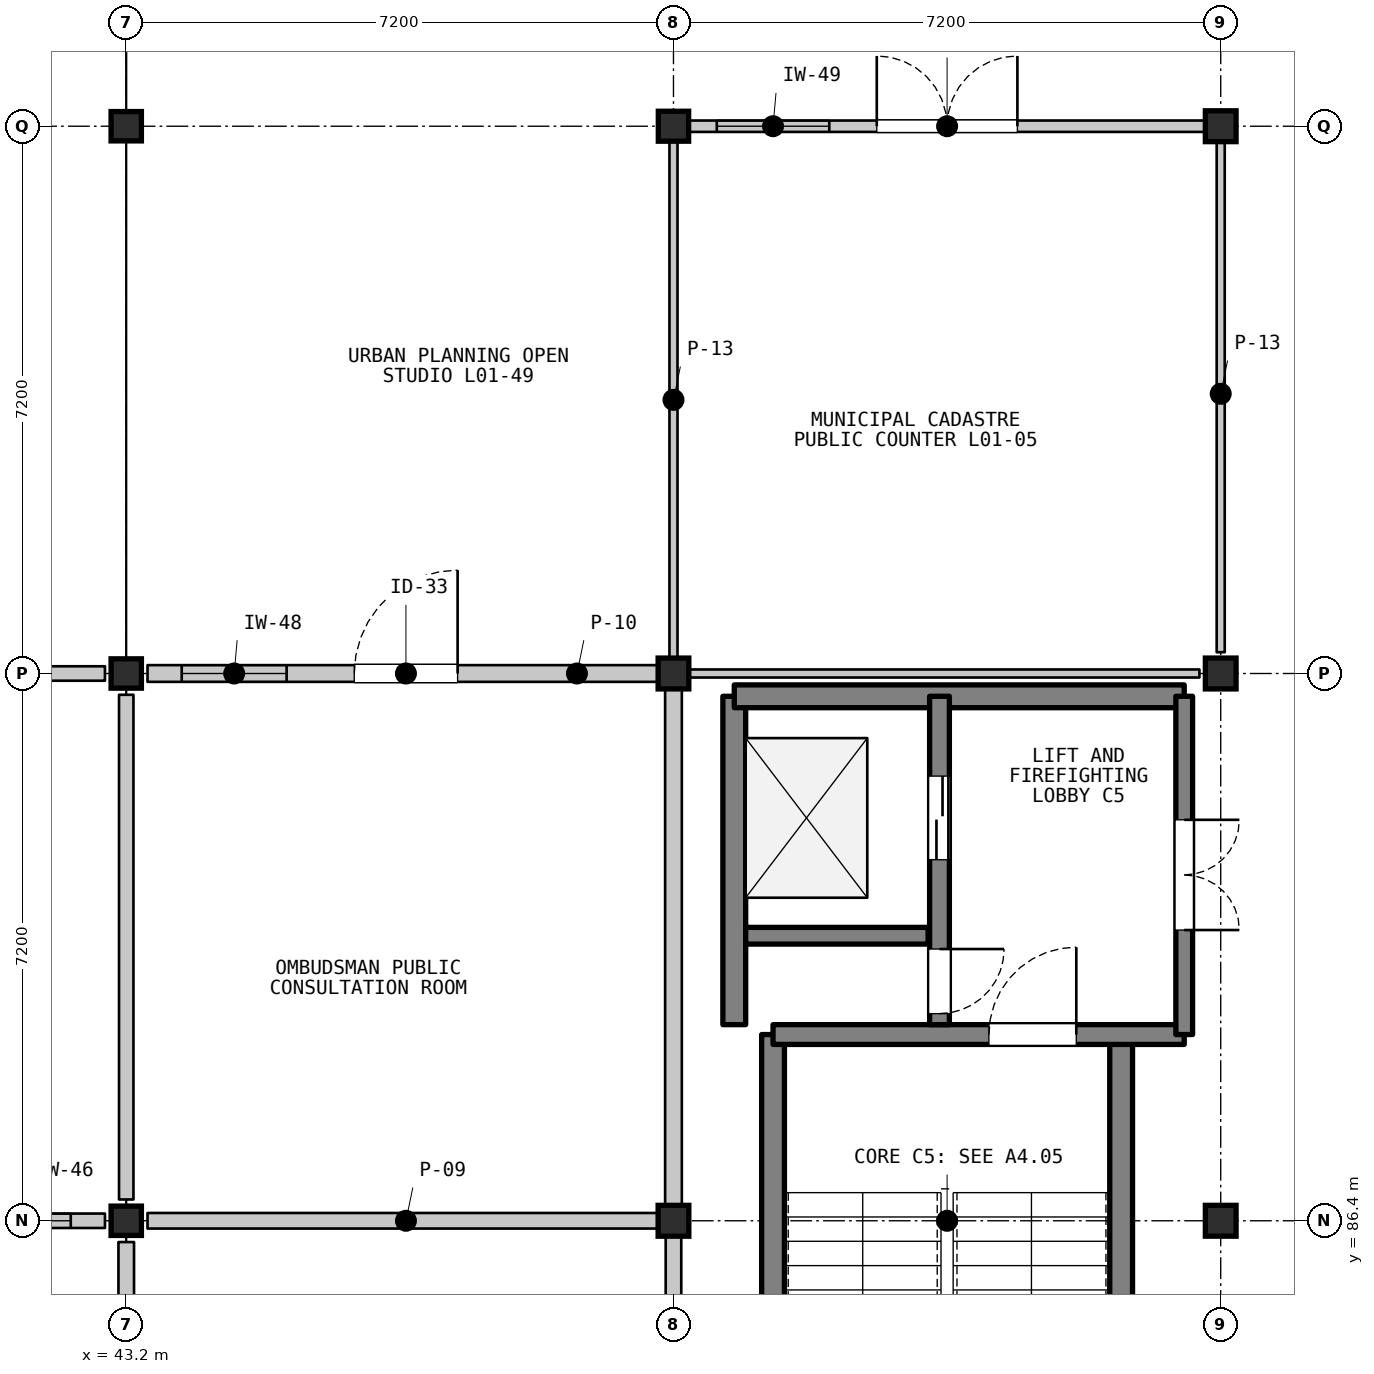
"""IFC4 building model, lengths in metres.
Left out: names, types, materials, properties, quantities, classifications, styles, units other than length and angle.
Written with IfcOpenShell. Run it as: python <this file> out.ifc"""

import sys

from ifc_helpers import new_model, si_unit, direction, frame, frame_2d, origin, origin_2d, place, context, subcontext, project, spatial, rectangle, i_section, extrude, element, fill, save


model = new_model("IFC4")
c1 = context("Model", 3, precision=1e-05, world=origin(), true_north=direction((0.0, 1.0)))
c2 = subcontext(c1, "Body", "Model", "MODEL_VIEW")
j1 = project(units=[si_unit("LENGTHUNIT", "METRE"), si_unit("PLANEANGLEUNIT", "RADIAN")], contexts=[c1])
p1 = place(None, origin())
s1 = spatial("IfcSite", under=j1, at=p1, CompositionType="ELEMENT")
p2 = place(p1, origin())
s2 = spatial("IfcBuilding", under=s1, at=p2, CompositionType="ELEMENT")
p3 = place(p2, origin())
s3 = spatial("IfcBuildingStorey", under=s2, at=p3, CompositionType="ELEMENT", Elevation=0.0)
for number, where, z_axis, x_axis in (
    (1, (43.2, 86.4, 0.0), (0.0, 0.0, 1.0), (1.0, 0.0, 0.0)),
    (2, (43.2, 93.6, 0.0), (0.0, 0.0, 1.0), (1.0, 0.0, 0.0)),
    (3, (43.2, 100.8, 0.0), (0.0, 0.0, 1.0), (1.0, 0.0, 0.0)),
):
    element("IfcColumn", number, at=place(p3, frame(where, z_axis=z_axis, x_axis=x_axis)), inside=s3, PredefinedType="COLUMN", context=c2, shape_type="SweptSolid", body=[
        extrude(i_section(OverallWidth=0.399, OverallDepth=0.386, WebThickness=0.021, FlangeThickness=0.033, FilletRadius=0.015, at=origin_2d()), origin(), (0.0, 0.0, 1.0), 5.4),
    ])
for number, where, z_axis, x_axis in (
    (4, (50.4, 86.4, 0.0), (0.0, 0.0, 1.0), (1.0, 0.0, 0.0)),
    (5, (50.4, 93.6, 0.0), (0.0, 0.0, 1.0), (1.0, 0.0, 0.0)),
):
    element("IfcColumn", number, at=place(p3, frame(where, z_axis=z_axis, x_axis=x_axis)), inside=s3, PredefinedType="COLUMN", context=c2, shape_type="SweptSolid", body=[
        extrude(i_section(OverallWidth=0.404, OverallDepth=0.406, WebThickness=0.027, FlangeThickness=0.044, FilletRadius=0.015, at=origin_2d()), origin(), (0.0, 0.0, 1.0), 5.4),
    ])
p4 = place(p3, frame((50.4, 100.8, 0.0), z_axis=(0.0, 0.0, 1.0), x_axis=(1.0, 0.0, 0.0)))
e6 = element("IfcColumn", 6, at=p4, inside=s3, PredefinedType="COLUMN", context=c2, shape_type="SweptSolid", body=[
    extrude(i_section(OverallWidth=0.399, OverallDepth=0.394, WebThickness=0.023, FlangeThickness=0.037, FilletRadius=0.015, at=origin_2d()), origin(), (0.0, 0.0, 1.0), 5.4),
])
for number, where, z_axis, x_axis in (
    (7, (57.6, 86.4, 0.0), (0.0, 0.0, 1.0), (1.0, 0.0, 0.0)),
    (8, (57.6, 93.6, 0.0), (0.0, 0.0, 1.0), (1.0, 0.0, 0.0)),
    (9, (57.6, 100.8, 0.0), (0.0, 0.0, 1.0), (1.0, 0.0, 0.0)),
):
    element("IfcColumn", number, at=place(p3, frame(where, z_axis=z_axis, x_axis=x_axis)), inside=s3, PredefinedType="COLUMN", context=c2, shape_type="SweptSolid", body=[
        extrude(i_section(OverallWidth=0.404, OverallDepth=0.406, WebThickness=0.027, FlangeThickness=0.044, FilletRadius=0.015, at=origin_2d()), origin(), (0.0, 0.0, 1.0), 5.4),
    ])
for number, where, z_axis, x_axis in (
    (10, (51.71, 79.55, 0.0), (0.0, 0.0, 1.0), (0.0, 1.0, 0.0)),
    (11, (56.29, 79.55, 0.0), (0.0, 0.0, 1.0), (0.0, 1.0, 0.0)),
):
    element("IfcWall", number, at=place(p3, frame(where, z_axis=z_axis, x_axis=x_axis)), inside=s3, PredefinedType="SHEAR", context=c2, shape_type="SweptSolid", body=[
        extrude(rectangle(XDim=9.3, YDim=0.3, at=frame_2d((4.65, 0.0))), origin(), (0.0, 0.0, 1.0), 5.2),
    ])
p5 = place(p3, frame((51.71, 88.85, 0.0), z_axis=(0.0, 0.0, 1.0), x_axis=(1.0, 0.0, 0.0)))
e12 = element("IfcWall", 12, at=p5, inside=s3, PredefinedType="SHEAR", context=c2, shape_type="SweptSolid", body=[
    extrude(rectangle(XDim=5.41, YDim=0.26, at=frame_2d((2.705, 0.0))), origin(), (0.0, 0.0, 1.0), 5.2),
])
p6 = place(p5, frame((2.84, 0.0, 0.0)))
e13 = element("IfcOpeningElement", 13, at=p6, cuts=e12, PredefinedType="OPENING", context=c2, shape_type="SweptSolid", body=[
    extrude(rectangle(XDim=1.15, YDim=2.15, at=frame_2d((0.575, 1.075))), frame((0.0, 0.14, 0.0), z_axis=(0.0, -1.0, 0.0), x_axis=(1.0, 0.0, 0.0)), (0.0, 0.0, 1.0), 0.28),
])
p7 = place(p3, frame((51.2, 88.98, 0.0), z_axis=(0.0, 0.0, 1.0), x_axis=(0.0, 1.0, 0.0)))
e14 = element("IfcWall", 14, at=p7, inside=s3, PredefinedType="SHEAR", context=c2, shape_type="SweptSolid", body=[
    extrude(rectangle(XDim=4.32, YDim=0.3, at=frame_2d((2.16, 0.0))), origin(), (0.0, 0.0, 1.0), 5.2),
])
p8 = place(p3, frame((51.2, 93.3, 0.0), z_axis=(0.0, 0.0, 1.0), x_axis=(1.0, 0.0, 0.0)))
e15 = element("IfcWall", 15, at=p8, inside=s3, PredefinedType="SHEAR", context=c2, shape_type="SweptSolid", body=[
    extrude(rectangle(XDim=5.92, YDim=0.3, at=frame_2d((2.96, 0.0))), origin(), (0.0, 0.0, 1.0), 5.2),
])
p9 = place(p3, frame((51.35, 90.15, 0.0), z_axis=(0.0, 0.0, 1.0), x_axis=(1.0, 0.0, 0.0)))
e16 = element("IfcWall", 16, at=p9, inside=s3, PredefinedType="SHEAR", context=c2, shape_type="SweptSolid", body=[
    extrude(rectangle(XDim=2.4, YDim=0.22, at=frame_2d((1.2, 0.0))), origin(), (0.0, 0.0, 1.0), 5.2),
])
p10 = place(p3, frame((53.9, 93.3, 0.0), z_axis=(0.0, 0.0, 1.0), x_axis=(0.0, -1.0, 0.0)))
e17 = element("IfcWall", 17, at=p10, inside=s3, PredefinedType="SHEAR", context=c2, shape_type="SweptSolid", body=[
    extrude(rectangle(XDim=4.32, YDim=0.26, at=frame_2d((2.16, 0.0))), origin(), (0.0, 0.0, 1.0), 5.2),
])
p11 = place(p10, frame((1.05, 0.0, 0.0)))
e18 = element("IfcOpeningElement", 18, at=p11, cuts=e17, PredefinedType="OPENING", context=c2, shape_type="SweptSolid", body=[
    extrude(rectangle(XDim=1.1, YDim=2.15, at=frame_2d((0.55, 1.075))), frame((0.0, 0.14, 0.0), z_axis=(0.0, -1.0, 0.0), x_axis=(1.0, 0.0, 0.0)), (0.0, 0.0, 1.0), 0.28),
])
p12 = place(p10, frame((3.325, 0.0, 0.0)))
e19 = element("IfcOpeningElement", 19, at=p12, cuts=e17, PredefinedType="OPENING", context=c2, shape_type="SweptSolid", body=[
    extrude(rectangle(XDim=0.85, YDim=2.05, at=frame_2d((0.425, 1.025))), frame((0.0, 0.14, 0.0), z_axis=(0.0, -1.0, 0.0), x_axis=(1.0, 0.0, 0.0)), (0.0, 0.0, 1.0), 0.28),
])
p13 = place(p3, frame((57.12, 93.3, 0.0), z_axis=(0.0, 0.0, 1.0), x_axis=(0.0, -1.0, 0.0)))
e20 = element("IfcWall", 20, at=p13, inside=s3, PredefinedType="SHEAR", context=c2, shape_type="SweptSolid", body=[
    extrude(rectangle(XDim=4.45, YDim=0.22, at=frame_2d((2.225, 0.0))), origin(), (0.0, 0.0, 1.0), 5.2),
])
p14 = place(p13, frame((1.625, 0.0, 0.0)))
e21 = element("IfcOpeningElement", 21, at=p14, cuts=e20, PredefinedType="OPENING", context=c2, shape_type="SweptSolid", body=[
    extrude(rectangle(XDim=1.45, YDim=2.2, at=frame_2d((0.725, 1.1))), frame((0.0, 0.12, 0.0), z_axis=(0.0, -1.0, 0.0), x_axis=(1.0, 0.0, 0.0)), (0.0, 0.0, 1.0), 0.24),
])
p15 = place(p3, frame((42.92, 86.4, 0.0), z_axis=(0.0, 0.0, 1.0), x_axis=(-1.0, 0.0, 0.0)))
e22 = element("IfcWall", 22, at=p15, inside=s3, PredefinedType="PARTITIONING", context=c2, shape_type="SweptSolid", body=[
    extrude(rectangle(XDim=6.8, YDim=0.19, at=frame_2d((3.4, 0.0))), origin(), (0.0, 0.0, 1.0), 4.588),
])
p16 = place(p15, frame((2.55, 0.0, 0.0)))
e23 = element("IfcOpeningElement", 23, at=p16, cuts=e22, PredefinedType="OPENING", context=c2, shape_type="SweptSolid", body=[
    extrude(rectangle(XDim=1.7, YDim=2.35, at=frame_2d((0.85, 1.175))), frame((0.0, 0.105, 0.0), z_axis=(0.0, -1.0, 0.0), x_axis=(1.0, 0.0, 0.0)), (0.0, 0.0, 1.0), 0.21),
])
p17 = place(p15, frame((0.45, 0.0, 1.05)))
e24 = element("IfcOpeningElement", 24, at=p17, cuts=e22, PredefinedType="OPENING", context=c2, shape_type="SweptSolid", body=[
    extrude(rectangle(XDim=1.18, YDim=1.44, at=frame_2d((0.59, 0.72))), frame((0.0, 0.105, 0.0), z_axis=(0.0, -1.0, 0.0), x_axis=(1.0, 0.0, 0.0)), (0.0, 0.0, 1.0), 0.21),
])
p18 = place(p3, frame((36.12, 93.6, 0.0), z_axis=(0.0, 0.0, 1.0), x_axis=(1.0, 0.0, 0.0)))
e25 = element("IfcWall", 25, at=p18, inside=s3, PredefinedType="PARTITIONING", context=c2, shape_type="SweptSolid", body=[
    extrude(rectangle(XDim=6.8, YDim=0.19, at=frame_2d((3.4, 0.0))), origin(), (0.0, 0.0, 1.0), 4.588),
])
p19 = place(p3, frame((43.2, 93.32, 0.0), z_axis=(0.0, 0.0, 1.0), x_axis=(0.0, -1.0, 0.0)))
e26 = element("IfcWall", 26, at=p19, inside=s3, PredefinedType="PARTITIONING", context=c2, shape_type="SweptSolid", body=[
    extrude(rectangle(XDim=6.64, YDim=0.19, at=frame_2d((3.32, 0.0))), origin(), (0.0, 0.0, 1.0), 4.657),
])
p20 = place(p3, frame((43.2, 79.48, 0.0), z_axis=(0.0, 0.0, 1.0), x_axis=(0.0, 1.0, 0.0)))
e27 = element("IfcWall", 27, at=p20, inside=s3, PredefinedType="PARTITIONING", context=c2, shape_type="SweptSolid", body=[
    extrude(rectangle(XDim=6.64, YDim=0.205, at=frame_2d((3.32, 0.0))), origin(), (0.0, 0.0, 1.0), 4.657),
])
p21 = place(p20, frame((2.66, 0.0, 0.0)))
e28 = element("IfcOpeningElement", 28, at=p21, cuts=e27, PredefinedType="OPENING", context=c2, shape_type="SweptSolid", body=[
    extrude(rectangle(XDim=1.32, YDim=2.24, at=frame_2d((0.66, 1.12))), frame((0.0, 0.113, 0.0), z_axis=(0.0, -1.0, 0.0), x_axis=(1.0, 0.0, 0.0)), (0.0, 0.0, 1.0), 0.225),
])
p22 = place(p20, frame((0.45, 0.0, 1.05)))
e29 = element("IfcOpeningElement", 29, at=p22, cuts=e27, PredefinedType="OPENING", context=c2, shape_type="SweptSolid", body=[
    extrude(rectangle(XDim=1.28, YDim=1.44, at=frame_2d((0.64, 0.72))), frame((0.0, 0.113, 0.0), z_axis=(0.0, -1.0, 0.0), x_axis=(1.0, 0.0, 0.0)), (0.0, 0.0, 1.0), 0.225),
])
p23 = place(p3, frame((43.48, 86.4, 0.0), z_axis=(0.0, 0.0, 1.0), x_axis=(1.0, 0.0, 0.0)))
e30 = element("IfcWall", 30, at=p23, inside=s3, PredefinedType="PARTITIONING", context=c2, shape_type="SweptSolid", body=[
    extrude(rectangle(XDim=6.8, YDim=0.205, at=frame_2d((3.4, 0.0))), origin(), (0.0, 0.0, 1.0), 4.588),
])
p24 = place(p3, frame((50.4, 86.28, 0.0), z_axis=(0.0, 0.0, 1.0), x_axis=(0.0, -1.0, 0.0)))
e31 = element("IfcWall", 31, at=p24, inside=s3, PredefinedType="PARTITIONING", context=c2, shape_type="SweptSolid", body=[
    extrude(rectangle(XDim=6.96, YDim=0.205, at=frame_2d((3.48, 0.0))), origin(), (0.0, 0.0, 1.0), 4.588),
])
p25 = place(p3, frame((43.48, 93.6, 0.0), z_axis=(0.0, 0.0, 1.0), x_axis=(1.0, 0.0, 0.0)))
e32 = element("IfcWall", 32, at=p25, inside=s3, PredefinedType="PARTITIONING", context=c2, shape_type="SweptSolid", body=[
    extrude(rectangle(XDim=6.8, YDim=0.22, at=frame_2d((3.4, 0.0))), origin(), (0.0, 0.0, 1.0), 4.588),
])
p26 = place(p25, frame((2.72, 0.0, 0.0)))
e33 = element("IfcOpeningElement", 33, at=p26, cuts=e32, PredefinedType="OPENING", context=c2, shape_type="SweptSolid", body=[
    extrude(rectangle(XDim=1.36, YDim=2.24, at=frame_2d((0.68, 1.12))), frame((0.0, 0.12, 0.0), z_axis=(0.0, -1.0, 0.0), x_axis=(1.0, 0.0, 0.0)), (0.0, 0.0, 1.0), 0.24),
])
p27 = place(p25, frame((0.45, 0.0, 1.05)))
e34 = element("IfcOpeningElement", 34, at=p27, cuts=e32, PredefinedType="OPENING", context=c2, shape_type="SweptSolid", body=[
    extrude(rectangle(XDim=1.38, YDim=1.44, at=frame_2d((0.69, 0.72))), frame((0.0, 0.12, 0.0), z_axis=(0.0, -1.0, 0.0), x_axis=(1.0, 0.0, 0.0)), (0.0, 0.0, 1.0), 0.24),
])
p28 = place(p3, frame((50.4, 93.48, 0.0), z_axis=(0.0, 0.0, 1.0), x_axis=(0.0, -1.0, 0.0)))
e35 = element("IfcWall", 35, at=p28, inside=s3, PredefinedType="PARTITIONING", context=c2, shape_type="SweptSolid", body=[
    extrude(rectangle(XDim=6.96, YDim=0.22, at=frame_2d((3.48, 0.0))), origin(), (0.0, 0.0, 1.0), 4.588),
])
p29 = place(p3, frame((50.52, 100.8, 0.0), z_axis=(0.0, 0.0, 1.0), x_axis=(1.0, 0.0, 0.0)))
e36 = element("IfcWall", 36, at=p29, inside=s3, PredefinedType="PARTITIONING", context=c2, shape_type="SweptSolid", body=[
    extrude(rectangle(XDim=6.96, YDim=0.15, at=frame_2d((3.48, 0.0))), origin(), (0.0, 0.0, 1.0), 4.588),
])
p30 = place(p29, frame((2.555, 0.0, 0.0)))
e37 = element("IfcOpeningElement", 37, at=p30, cuts=e36, PredefinedType="OPENING", context=c2, shape_type="SweptSolid", body=[
    extrude(rectangle(XDim=1.85, YDim=2.45, at=frame_2d((0.925, 1.225))), frame((0.0, 0.085, 0.0), z_axis=(0.0, -1.0, 0.0), x_axis=(1.0, 0.0, 0.0)), (0.0, 0.0, 1.0), 0.17),
])
p31 = place(p29, frame((0.45, 0.0, 1.05)))
e38 = element("IfcOpeningElement", 38, at=p31, cuts=e36, PredefinedType="OPENING", context=c2, shape_type="SweptSolid", body=[
    extrude(rectangle(XDim=1.48, YDim=1.48, at=frame_2d((0.74, 0.74))), frame((0.0, 0.085, 0.0), z_axis=(0.0, -1.0, 0.0), x_axis=(1.0, 0.0, 0.0)), (0.0, 0.0, 1.0), 0.17),
])
p32 = place(p3, frame((57.32, 93.6, 0.0), z_axis=(0.0, 0.0, 1.0), x_axis=(-1.0, 0.0, 0.0)))
e39 = element("IfcWall", 39, at=p32, inside=s3, PredefinedType="PARTITIONING", context=c2, shape_type="SweptSolid", body=[
    extrude(rectangle(XDim=6.8, YDim=0.106, at=frame_2d((3.4, 0.0))), origin(), (0.0, 0.0, 1.0), 4.588),
])
p33 = place(p3, frame((50.4, 93.72, 0.0), z_axis=(0.0, 0.0, 1.0), x_axis=(0.0, 1.0, 0.0)))
e40 = element("IfcWall", 40, at=p33, inside=s3, PredefinedType="PARTITIONING", context=c2, shape_type="SweptSolid", body=[
    extrude(rectangle(XDim=6.96, YDim=0.106, at=frame_2d((3.48, 0.0))), origin(), (0.0, 0.0, 1.0), 4.588),
])
p34 = place(p3, frame((57.6, 100.68, 0.0), z_axis=(0.0, 0.0, 1.0), x_axis=(0.0, -1.0, 0.0)))
e41 = element("IfcWall", 41, at=p34, inside=s3, PredefinedType="PARTITIONING", context=c2, shape_type="SweptSolid", body=[
    extrude(rectangle(XDim=6.8, YDim=0.106, at=frame_2d((3.4, 0.0))), origin(), (0.0, 0.0, 1.0), 4.588),
])
p35 = place(p6, origin())
e42 = element("IfcDoor", 42, at=p35, inside=s3, OperationType="SINGLE_SWING_RIGHT", PredefinedType="DOOR", context=c2, shape_type="SweptSolid", body=[
    extrude(rectangle(XDim=1.15, YDim=2.15, at=frame_2d((0.575, 1.075))), frame((0.0, 0.025, 0.0), z_axis=(0.0, -1.0, 0.0), x_axis=(1.0, 0.0, 0.0)), (0.0, 0.0, 1.0), 0.05),
])
fill(e13, e42)
p36 = place(p11, origin())
e43 = element("IfcDoor", 43, at=p36, inside=s3, OperationType="DOUBLE_DOOR_SLIDING", PredefinedType="DOOR", context=c2, shape_type="SweptSolid", body=[
    extrude(rectangle(XDim=1.1, YDim=2.15, at=frame_2d((0.55, 1.075))), frame((0.0, 0.025, 0.0), z_axis=(0.0, -1.0, 0.0), x_axis=(1.0, 0.0, 0.0)), (0.0, 0.0, 1.0), 0.05),
])
fill(e18, e43)
p37 = place(p12, origin())
e44 = element("IfcDoor", 44, at=p37, inside=s3, OperationType="SINGLE_SWING_LEFT", PredefinedType="DOOR", context=c2, shape_type="SweptSolid", body=[
    extrude(rectangle(XDim=0.85, YDim=2.05, at=frame_2d((0.425, 1.025))), frame((0.0, 0.025, 0.0), z_axis=(0.0, -1.0, 0.0), x_axis=(1.0, 0.0, 0.0)), (0.0, 0.0, 1.0), 0.05),
])
fill(e19, e44)
p38 = place(p14, origin())
e45 = element("IfcDoor", 45, at=p38, inside=s3, OperationType="DOUBLE_DOOR_SINGLE_SWING", PredefinedType="DOOR", context=c2, shape_type="SweptSolid", body=[
    extrude(rectangle(XDim=1.45, YDim=2.2, at=frame_2d((0.725, 1.1))), frame((0.0, 0.025, 0.0), z_axis=(0.0, -1.0, 0.0), x_axis=(1.0, 0.0, 0.0)), (0.0, 0.0, 1.0), 0.05),
])
fill(e21, e45)
p39 = place(p17, origin())
e46 = element("IfcWindow", 46, at=p39, inside=s3, PartitioningType="SINGLE_PANEL", PredefinedType="WINDOW", context=c2, shape_type="SweptSolid", body=[
    extrude(rectangle(XDim=1.18, YDim=1.44, at=frame_2d((0.59, 0.72))), frame((0.0, 0.03, 0.0), z_axis=(0.0, -1.0, 0.0), x_axis=(1.0, 0.0, 0.0)), (0.0, 0.0, 1.0), 0.06),
])
fill(e24, e46)
p40 = place(p26, origin())
e47 = element("IfcDoor", 47, at=p40, inside=s3, OperationType="SINGLE_SWING_RIGHT", PredefinedType="DOOR", context=c2, shape_type="SweptSolid", body=[
    extrude(rectangle(XDim=1.36, YDim=2.24, at=frame_2d((0.68, 1.12))), frame((0.0, 0.025, 0.0), z_axis=(0.0, -1.0, 0.0), x_axis=(1.0, 0.0, 0.0)), (0.0, 0.0, 1.0), 0.05),
])
fill(e33, e47)
p41 = place(p27, origin())
e48 = element("IfcWindow", 48, at=p41, inside=s3, PartitioningType="SINGLE_PANEL", PredefinedType="WINDOW", context=c2, shape_type="SweptSolid", body=[
    extrude(rectangle(XDim=1.38, YDim=1.44, at=frame_2d((0.69, 0.72))), frame((0.0, 0.03, 0.0), z_axis=(0.0, -1.0, 0.0), x_axis=(1.0, 0.0, 0.0)), (0.0, 0.0, 1.0), 0.06),
])
fill(e34, e48)
p42 = place(p30, origin())
e49 = element("IfcDoor", 49, at=p42, inside=s3, OperationType="DOUBLE_DOOR_SINGLE_SWING", PredefinedType="DOOR", context=c2, shape_type="SweptSolid", body=[
    extrude(rectangle(XDim=1.85, YDim=2.45, at=frame_2d((0.925, 1.225))), frame((0.0, 0.025, 0.0), z_axis=(0.0, -1.0, 0.0), x_axis=(1.0, 0.0, 0.0)), (0.0, 0.0, 1.0), 0.05),
])
fill(e37, e49)
p43 = place(p31, origin())
e50 = element("IfcWindow", 50, at=p43, inside=s3, PartitioningType="SINGLE_PANEL", PredefinedType="WINDOW", context=c2, shape_type="SweptSolid", body=[
    extrude(rectangle(XDim=1.48, YDim=1.48, at=frame_2d((0.74, 0.74))), frame((0.0, 0.03, 0.0), z_axis=(0.0, -1.0, 0.0), x_axis=(1.0, 0.0, 0.0)), (0.0, 0.0, 1.0), 0.06),
])
fill(e38, e50)
save(model, sys.argv[1])
